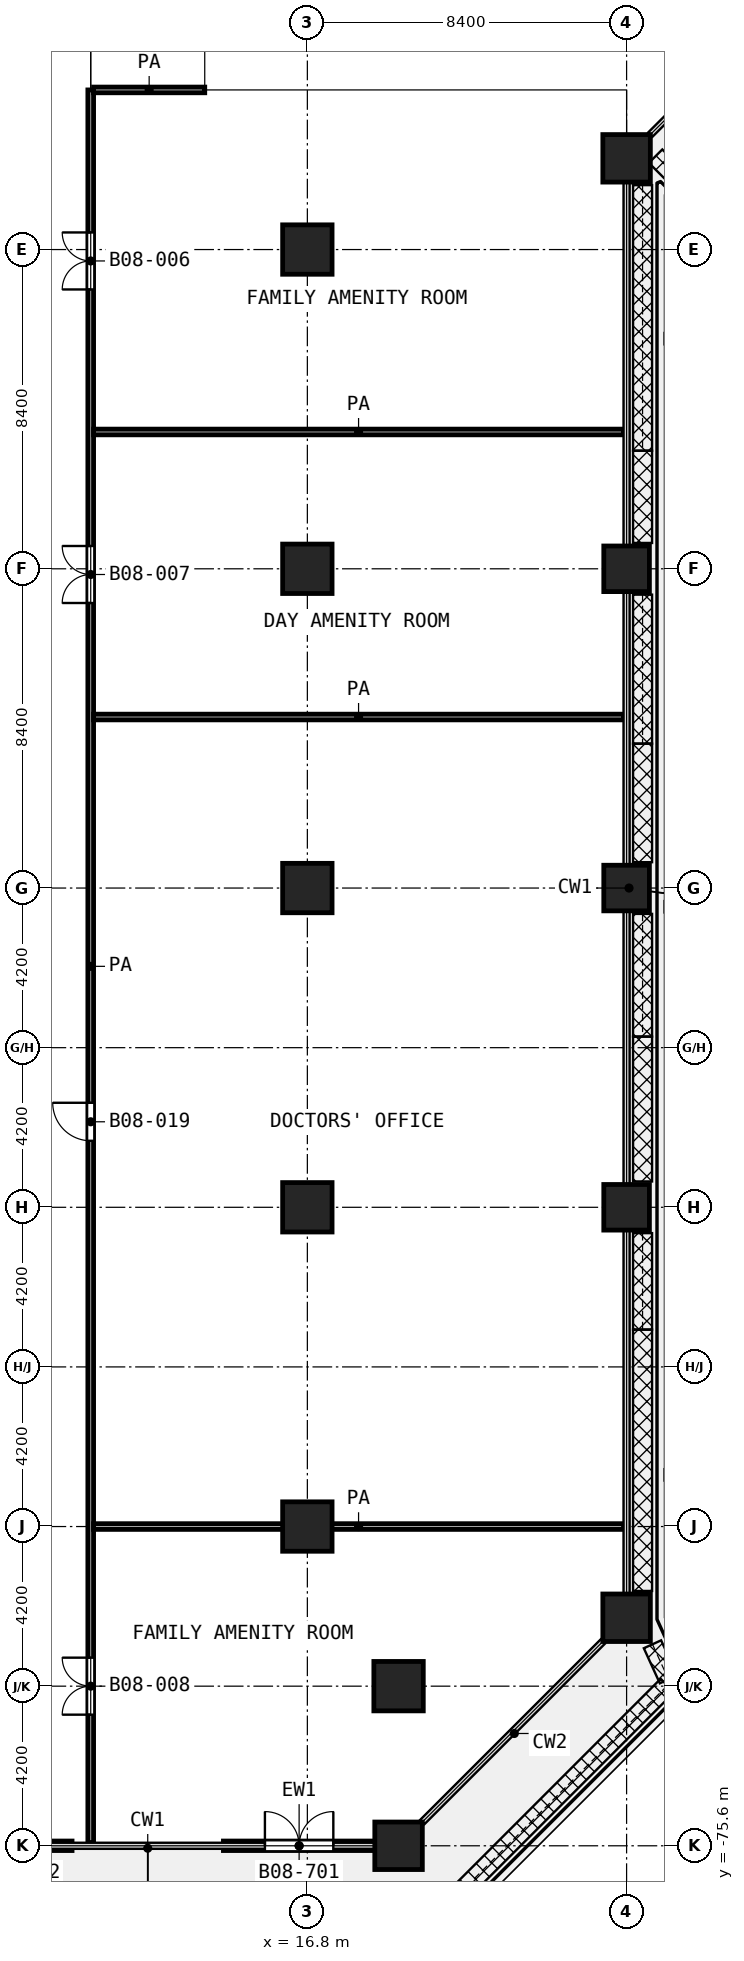
"""IFC4 building model, lengths in metres.
Left out: names, types, materials, properties, quantities, classifications, styles, units other than length and angle.
Written with IfcOpenShell. Run it as: python <this file> out.ifc"""

import sys

from ifc_helpers import new_model, si_unit, direction, frame, frame_2d, origin, origin_2d, place, context, subcontext, project, spatial, rectangle, extrude, element, fill, save


model = new_model("IFC4")
c1 = context("Model", 3, precision=1e-05, world=origin(), true_north=direction((0.0, 1.0)))
c2 = subcontext(c1, "Body", "Model", "MODEL_VIEW")
j1 = project(units=[si_unit("LENGTHUNIT", "METRE"), si_unit("PLANEANGLEUNIT", "RADIAN")], contexts=[c1])
p1 = place(None, origin())
s1 = spatial("IfcSite", under=j1, at=p1, CompositionType="ELEMENT")
p2 = place(p1, origin())
s2 = spatial("IfcBuilding", under=s1, at=p2, CompositionType="ELEMENT")
p3 = place(p2, frame((0.0, 0.0, 39.2)))
s3 = spatial("IfcBuildingStorey", under=s2, at=p3, CompositionType="ELEMENT", Elevation=39.2)
p4 = place(p3, frame((25.2, -31.2, 0.0), z_axis=(0.0, 0.0, 1.0), x_axis=(1.0, 0.0, 0.0)))
e1 = element("IfcColumn", 1, at=p4, inside=s3, PredefinedType="COLUMN", context=c2, shape_type="SweptSolid", body=[
    extrude(rectangle(XDim=1.25, YDim=1.25, at=origin_2d()), origin(), (0.0, 0.0, 1.0), 4.2),
])
for number, where, z_axis, x_axis in (
    (2, (16.8, -33.6, 0.0), (0.0, 0.0, 1.0), (1.0, 0.0, 0.0)),
    (3, (16.8, -42.0, 0.0), (0.0, 0.0, 1.0), (1.0, 0.0, 0.0)),
):
    element("IfcColumn", number, at=place(p3, frame(where, z_axis=z_axis, x_axis=x_axis)), inside=s3, PredefinedType="COLUMN", context=c2, shape_type="SweptSolid", body=[
        extrude(rectangle(XDim=1.3, YDim=1.3, at=origin_2d()), origin(), (0.0, 0.0, 1.0), 4.2),
    ])
p5 = place(p3, frame((25.2, -42.0, 0.0), z_axis=(0.0, 0.0, 1.0), x_axis=(1.0, 0.0, 0.0)))
e4 = element("IfcColumn", 4, at=p5, inside=s3, PredefinedType="COLUMN", context=c2, shape_type="SweptSolid", body=[
    extrude(rectangle(XDim=1.2, YDim=1.2, at=origin_2d()), origin(), (0.0, 0.0, 1.0), 4.2),
])
p6 = place(p3, frame((16.8, -50.4, 0.0), z_axis=(0.0, 0.0, 1.0), x_axis=(1.0, 0.0, 0.0)))
e5 = element("IfcColumn", 5, at=p6, inside=s3, PredefinedType="COLUMN", context=c2, shape_type="SweptSolid", body=[
    extrude(rectangle(XDim=1.3, YDim=1.3, at=origin_2d()), origin(), (0.0, 0.0, 1.0), 4.2),
])
p7 = place(p3, frame((25.2, -50.4, 0.0), z_axis=(0.0, 0.0, 1.0), x_axis=(1.0, 0.0, 0.0)))
e6 = element("IfcColumn", 6, at=p7, inside=s3, PredefinedType="COLUMN", context=c2, shape_type="SweptSolid", body=[
    extrude(rectangle(XDim=1.2, YDim=1.2, at=origin_2d()), origin(), (0.0, 0.0, 1.0), 4.2),
])
p8 = place(p3, frame((16.8, -58.8, 0.0), z_axis=(0.0, 0.0, 1.0), x_axis=(1.0, 0.0, 0.0)))
e7 = element("IfcColumn", 7, at=p8, inside=s3, PredefinedType="COLUMN", context=c2, shape_type="SweptSolid", body=[
    extrude(rectangle(XDim=1.3, YDim=1.3, at=origin_2d()), origin(), (0.0, 0.0, 1.0), 4.2),
])
p9 = place(p3, frame((25.2, -58.8, 0.0), z_axis=(0.0, 0.0, 1.0), x_axis=(1.0, 0.0, 0.0)))
e8 = element("IfcColumn", 8, at=p9, inside=s3, PredefinedType="COLUMN", context=c2, shape_type="SweptSolid", body=[
    extrude(rectangle(XDim=1.2, YDim=1.2, at=origin_2d()), origin(), (0.0, 0.0, 1.0), 4.2),
])
p10 = place(p3, frame((16.8, -67.2, 0.0), z_axis=(0.0, 0.0, 1.0), x_axis=(1.0, 0.0, 0.0)))
e9 = element("IfcColumn", 9, at=p10, inside=s3, PredefinedType="COLUMN", context=c2, shape_type="SweptSolid", body=[
    extrude(rectangle(XDim=1.3, YDim=1.3, at=origin_2d()), origin(), (0.0, 0.0, 1.0), 4.2),
])
p11 = place(p3, frame((25.2, -69.6, 0.0), z_axis=(0.0, 0.0, 1.0), x_axis=(1.0, 0.0, 0.0)))
e10 = element("IfcColumn", 10, at=p11, inside=s3, PredefinedType="COLUMN", context=c2, shape_type="SweptSolid", body=[
    extrude(rectangle(XDim=1.25, YDim=1.25, at=origin_2d()), origin(), (0.0, 0.0, 1.0), 4.2),
])
p12 = place(p3, frame((19.2, -71.4, 0.0), z_axis=(0.0, 0.0, 1.0), x_axis=(1.0, 0.0, 0.0)))
e11 = element("IfcColumn", 11, at=p12, inside=s3, PredefinedType="COLUMN", context=c2, shape_type="SweptSolid", body=[
    extrude(rectangle(XDim=1.3, YDim=1.3, at=origin_2d()), origin(), (0.0, 0.0, 1.0), 4.2),
])
p13 = place(p3, frame((19.2, -75.6, 0.0), z_axis=(0.0, 0.0, 1.0), x_axis=(1.0, 0.0, 0.0)))
e12 = element("IfcColumn", 12, at=p13, inside=s3, PredefinedType="COLUMN", context=c2, shape_type="SweptSolid", body=[
    extrude(rectangle(XDim=1.25, YDim=1.25, at=origin_2d()), origin(), (0.0, 0.0, 1.0), 4.2),
])
p14 = place(p3, frame((6.625, -75.6, 0.0), z_axis=(0.0, 0.0, 1.0), x_axis=(1.0, 0.0, 0.0)))
e13 = element("IfcWall", 13, at=p14, inside=s3, PredefinedType="SOLIDWALL", context=c2, shape_type="SweptSolid", body=[
    extrude(rectangle(XDim=3.983, YDim=0.25, at=frame_2d((1.992, 0.0))), origin(), (0.0, 0.0, 1.0), 3.78),
])
p15 = place(p14, frame((2.092, 0.0, 0.0)))
e14 = element("IfcOpeningElement", 14, at=p15, cuts=e13, PredefinedType="OPENING", context=c2, shape_type="SweptSolid", body=[
    extrude(rectangle(XDim=1.0, YDim=2.1, at=frame_2d((0.5, 1.05))), frame((0.0, 0.135, 0.0), z_axis=(0.0, -1.0, 0.0), x_axis=(1.0, 0.0, 0.0)), (0.0, 0.0, 1.0), 0.27),
])
p16 = place(p3, frame((14.592, -75.6, 0.0), z_axis=(0.0, 0.0, 1.0), x_axis=(1.0, 0.0, 0.0)))
e15 = element("IfcWall", 15, at=p16, inside=s3, PredefinedType="SOLIDWALL", context=c2, shape_type="SweptSolid", body=[
    extrude(rectangle(XDim=3.983, YDim=0.25, at=frame_2d((1.992, 0.0))), origin(), (0.0, 0.0, 1.0), 3.78),
])
p17 = place(p16, frame((1.092, 0.0, 0.0)))
e16 = element("IfcOpeningElement", 16, at=p17, cuts=e15, PredefinedType="OPENING", context=c2, shape_type="SweptSolid", body=[
    extrude(rectangle(XDim=1.8, YDim=2.1, at=frame_2d((0.9, 1.05))), frame((0.0, 0.135, 0.0), z_axis=(0.0, -1.0, 0.0), x_axis=(1.0, 0.0, 0.0)), (0.0, 0.0, 1.0), 0.27),
])
for number, where, z_axis, x_axis in (
    (17, (11.175, -67.2, 0.0), (0.0, 0.0, 1.0), (1.0, 0.0, 0.0)),
    (18, (11.175, -45.9, 0.0), (0.0, 0.0, 1.0), (1.0, 0.0, 0.0)),
    (19, (11.175, -38.4, 0.0), (0.0, 0.0, 1.0), (1.0, 0.0, 0.0)),
):
    element("IfcWall", number, at=place(p3, frame(where, z_axis=z_axis, x_axis=x_axis)), inside=s3, PredefinedType="PARTITIONING", context=c2, shape_type="SweptSolid", body=[
        extrude(rectangle(XDim=13.945, YDim=0.15, at=frame_2d((6.973, 0.0))), origin(), (0.0, 0.0, 1.0), 3.9),
    ])
p18 = place(p3, frame((11.175, -29.4, 0.0), z_axis=(0.0, 0.0, 1.0), x_axis=(1.0, 0.0, 0.0)))
e20 = element("IfcWall", 20, at=p18, inside=s3, PredefinedType="PARTITIONING", context=c2, shape_type="SweptSolid", body=[
    extrude(rectangle(XDim=2.925, YDim=0.15, at=frame_2d((1.462, 0.0))), origin(), (0.0, 0.0, 1.0), 3.9),
])
p19 = place(p3, frame((11.1, -75.52, 0.0), z_axis=(0.0, 0.0, 1.0), x_axis=(0.0, 1.0, 0.0)))
e21 = element("IfcWall", 21, at=p19, inside=s3, PredefinedType="PARTITIONING", context=c2, shape_type="SweptSolid", body=[
    extrude(rectangle(XDim=46.12, YDim=0.15, at=frame_2d((23.06, 0.0))), origin(), (0.0, 0.0, 1.0), 3.9),
])
p20 = place(p19, frame((40.87, 0.0, 0.0)))
e22 = element("IfcOpeningElement", 22, at=p20, cuts=e21, PredefinedType="OPENING", context=c2, shape_type="SweptSolid", body=[
    extrude(rectangle(XDim=1.5, YDim=2.1, at=frame_2d((0.75, 1.05))), frame((0.0, 0.085, 0.0), z_axis=(0.0, -1.0, 0.0), x_axis=(1.0, 0.0, 0.0)), (0.0, 0.0, 1.0), 0.17),
])
p21 = place(p19, frame((32.62, 0.0, 0.0)))
e23 = element("IfcOpeningElement", 23, at=p21, cuts=e21, PredefinedType="OPENING", context=c2, shape_type="SweptSolid", body=[
    extrude(rectangle(XDim=1.5, YDim=2.1, at=frame_2d((0.75, 1.05))), frame((0.0, 0.085, 0.0), z_axis=(0.0, -1.0, 0.0), x_axis=(1.0, 0.0, 0.0)), (0.0, 0.0, 1.0), 0.17),
])
p22 = place(p19, frame((18.47, 0.0, 0.0)))
e24 = element("IfcOpeningElement", 24, at=p22, cuts=e21, PredefinedType="OPENING", context=c2, shape_type="SweptSolid", body=[
    extrude(rectangle(XDim=1.0, YDim=2.1, at=frame_2d((0.5, 1.05))), frame((0.0, 0.085, 0.0), z_axis=(0.0, -1.0, 0.0), x_axis=(1.0, 0.0, 0.0)), (0.0, 0.0, 1.0), 0.17),
])
p23 = place(p19, frame((3.37, 0.0, 0.0)))
e25 = element("IfcOpeningElement", 25, at=p23, cuts=e21, PredefinedType="OPENING", context=c2, shape_type="SweptSolid", body=[
    extrude(rectangle(XDim=1.5, YDim=2.1, at=frame_2d((0.75, 1.05))), frame((0.0, 0.085, 0.0), z_axis=(0.0, -1.0, 0.0), x_axis=(1.0, 0.0, 0.0)), (0.0, 0.0, 1.0), 0.17),
])
p24 = place(p17, origin())
e26 = element("IfcDoor", 26, at=p24, inside=s3, OperationType="DOUBLE_DOOR_SINGLE_SWING", PredefinedType="DOOR", context=c2, shape_type="SweptSolid", body=[
    extrude(rectangle(XDim=1.8, YDim=2.1, at=frame_2d((0.9, 1.05))), frame((0.0, 0.025, 0.0), z_axis=(0.0, -1.0, 0.0), x_axis=(1.0, 0.0, 0.0)), (0.0, 0.0, 1.0), 0.05),
])
fill(e16, e26)
p25 = place(p20, origin())
e27 = element("IfcDoor", 27, at=p25, inside=s3, OperationType="DOUBLE_DOOR_SINGLE_SWING", PredefinedType="DOOR", context=c2, shape_type="SweptSolid", body=[
    extrude(rectangle(XDim=1.5, YDim=2.1, at=frame_2d((0.75, 1.05))), frame((0.0, 0.025, 0.0), z_axis=(0.0, -1.0, 0.0), x_axis=(1.0, 0.0, 0.0)), (0.0, 0.0, 1.0), 0.05),
])
fill(e22, e27)
p26 = place(p21, origin())
e28 = element("IfcDoor", 28, at=p26, inside=s3, OperationType="DOUBLE_DOOR_SINGLE_SWING", PredefinedType="DOOR", context=c2, shape_type="SweptSolid", body=[
    extrude(rectangle(XDim=1.5, YDim=2.1, at=frame_2d((0.75, 1.05))), frame((0.0, 0.025, 0.0), z_axis=(0.0, -1.0, 0.0), x_axis=(1.0, 0.0, 0.0)), (0.0, 0.0, 1.0), 0.05),
])
fill(e23, e28)
p27 = place(p22, origin())
e29 = element("IfcDoor", 29, at=p27, inside=s3, OperationType="SINGLE_SWING_RIGHT", PredefinedType="DOOR", context=c2, shape_type="SweptSolid", body=[
    extrude(rectangle(XDim=1.0, YDim=2.1, at=frame_2d((0.5, 1.05))), frame((0.0, 0.025, 0.0), z_axis=(0.0, -1.0, 0.0), x_axis=(1.0, 0.0, 0.0)), (0.0, 0.0, 1.0), 0.05),
])
fill(e24, e29)
p28 = place(p23, origin())
e30 = element("IfcDoor", 30, at=p28, inside=s3, OperationType="DOUBLE_DOOR_SINGLE_SWING", PredefinedType="DOOR", context=c2, shape_type="SweptSolid", body=[
    extrude(rectangle(XDim=1.5, YDim=2.1, at=frame_2d((0.75, 1.05))), frame((0.0, 0.025, 0.0), z_axis=(0.0, -1.0, 0.0), x_axis=(1.0, 0.0, 0.0)), (0.0, 0.0, 1.0), 0.05),
])
fill(e25, e30)
save(model, sys.argv[1])
